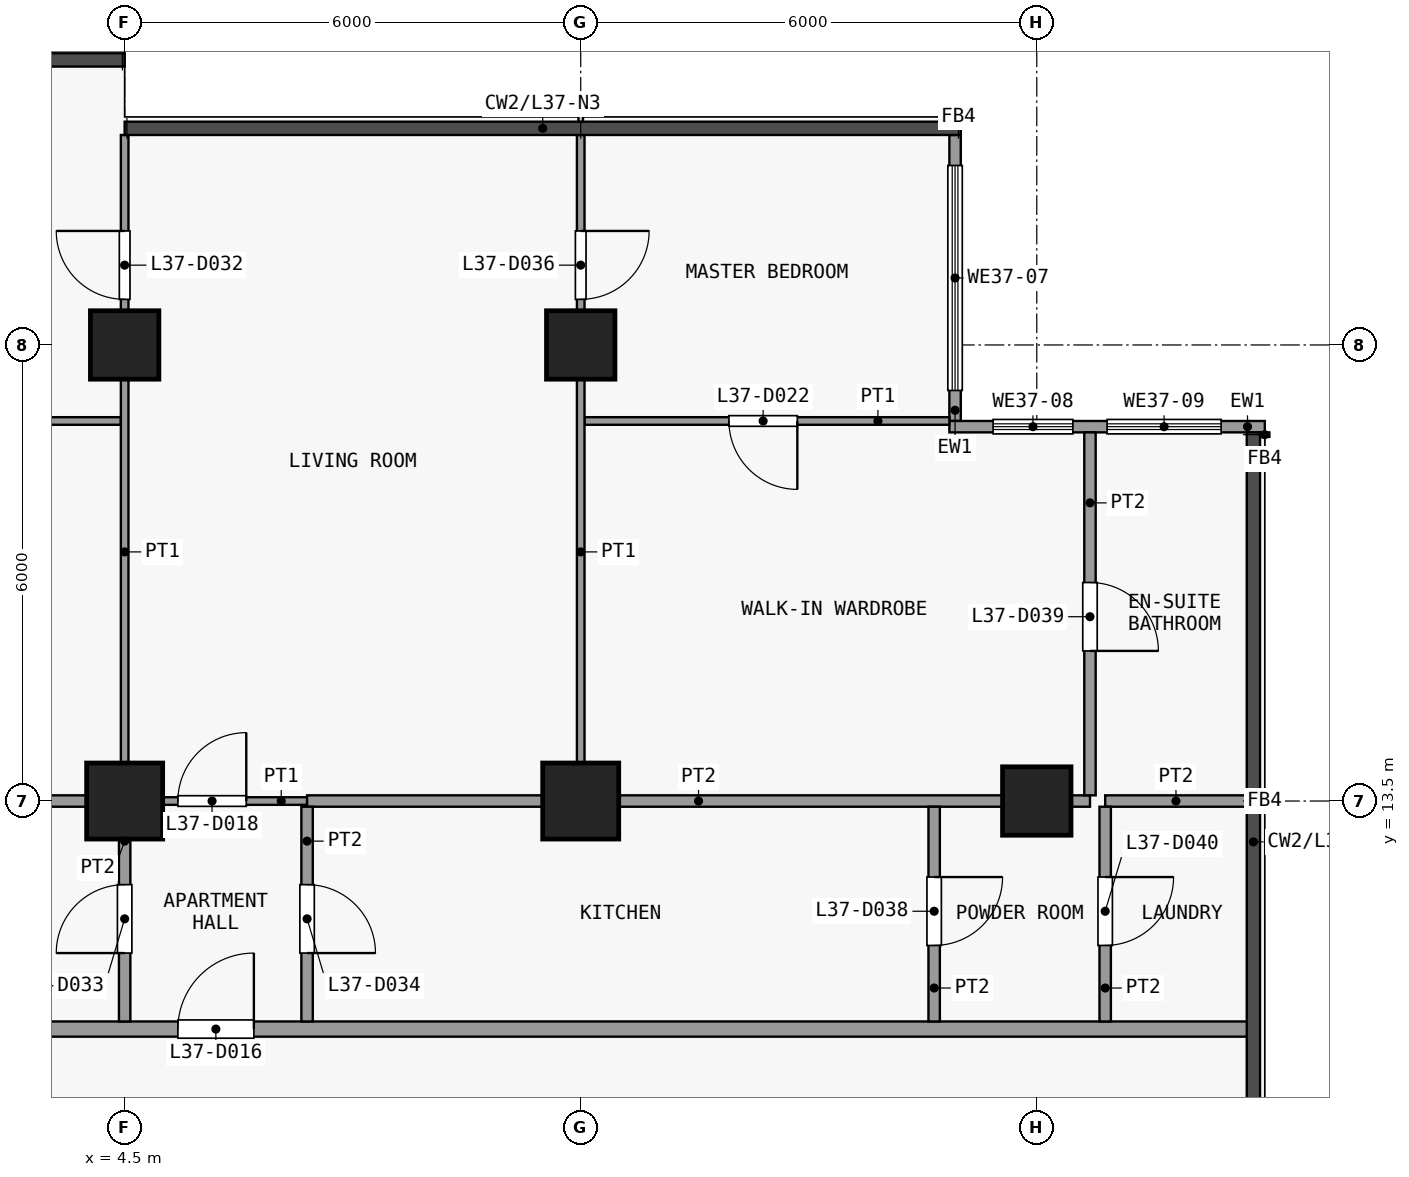
"""IFC4 building model, lengths in metres.
Left out: names, types, materials, properties, quantities, classifications, styles, units other than length and angle.
Written with IfcOpenShell. Run it as: python <this file> out.ifc"""

import sys

from ifc_helpers import new_model, si_unit, direction, frame, frame_2d, origin, origin_2d, place, context, subcontext, project, spatial, rectangle, extrude, element, fill, save


model = new_model("IFC4")
c1 = context("Model", 3, precision=1e-05, world=origin(), true_north=direction((0.0, 1.0)))
c2 = subcontext(c1, "Body", "Model", "MODEL_VIEW")
j1 = project(units=[si_unit("LENGTHUNIT", "METRE"), si_unit("PLANEANGLEUNIT", "RADIAN")], contexts=[c1])
p1 = place(None, origin())
s1 = spatial("IfcSite", under=j1, at=p1, CompositionType="ELEMENT")
p2 = place(p1, origin())
s2 = spatial("IfcBuilding", under=s1, at=p2, CompositionType="ELEMENT")
p3 = place(p2, frame((0.0, 0.0, 152.9)))
s3 = spatial("IfcBuildingStorey", under=s2, at=p3, CompositionType="ELEMENT", Elevation=152.9)
p4 = place(p3, frame((4.5, 13.5, 0.0), z_axis=(0.0, 0.0, 1.0), x_axis=(1.0, 0.0, 0.0)))
e1 = element("IfcColumn", 1, at=p4, inside=s3, PredefinedType="COLUMN", context=c2, shape_type="SweptSolid", body=[
    extrude(rectangle(XDim=1.0, YDim=1.0, at=origin_2d()), origin(), (0.0, 0.0, 1.0), 3.6),
])
p5 = place(p3, frame((4.5, 19.5, 0.0), z_axis=(0.0, 0.0, 1.0), x_axis=(1.0, 0.0, 0.0)))
e2 = element("IfcColumn", 2, at=p5, inside=s3, PredefinedType="COLUMN", context=c2, shape_type="SweptSolid", body=[
    extrude(rectangle(XDim=0.9, YDim=0.9, at=origin_2d()), origin(), (0.0, 0.0, 1.0), 3.6),
])
p6 = place(p3, frame((10.5, 13.5, 0.0), z_axis=(0.0, 0.0, 1.0), x_axis=(1.0, 0.0, 0.0)))
e3 = element("IfcColumn", 3, at=p6, inside=s3, PredefinedType="COLUMN", context=c2, shape_type="SweptSolid", body=[
    extrude(rectangle(XDim=1.0, YDim=1.0, at=origin_2d()), origin(), (0.0, 0.0, 1.0), 3.6),
])
for number, where, z_axis, x_axis in (
    (4, (10.5, 19.5, 0.0), (0.0, 0.0, 1.0), (1.0, 0.0, 0.0)),
    (5, (16.5, 13.5, 0.0), (0.0, 0.0, 1.0), (1.0, 0.0, 0.0)),
):
    element("IfcColumn", number, at=place(p3, frame(where, z_axis=z_axis, x_axis=x_axis)), inside=s3, PredefinedType="COLUMN", context=c2, shape_type="SweptSolid", body=[
        extrude(rectangle(XDim=0.9, YDim=0.9, at=origin_2d()), origin(), (0.0, 0.0, 1.0), 3.6),
    ])
p7 = place(p3, frame((15.425, 22.262, 0.0), z_axis=(0.0, 0.0, 1.0), x_axis=(0.0, -1.0, 0.0)))
e6 = element("IfcWall", 6, at=p7, inside=s3, PredefinedType="SOLIDWALL", context=c2, shape_type="SweptSolid", body=[
    extrude(rectangle(XDim=3.762, YDim=0.15, at=frame_2d((1.881, 0.0))), origin(), (0.0, 0.0, 1.0), 3.3),
])
p8 = place(p7, frame((0.401, 0.0, 0.9)))
e7 = element("IfcOpeningElement", 7, at=p8, cuts=e6, PredefinedType="OPENING", context=c2, shape_type="SweptSolid", body=[
    extrude(rectangle(XDim=2.96, YDim=2.4, at=frame_2d((1.48, 1.2))), frame((0.0, 0.085, 0.0), z_axis=(0.0, -1.0, 0.0), x_axis=(1.0, 0.0, 0.0)), (0.0, 0.0, 1.0), 0.17),
])
p9 = place(p3, frame((15.35, 18.425, 0.0), z_axis=(0.0, 0.0, 1.0), x_axis=(1.0, 0.0, 0.0)))
e8 = element("IfcWall", 8, at=p9, inside=s3, PredefinedType="SOLIDWALL", context=c2, shape_type="SweptSolid", body=[
    extrude(rectangle(XDim=4.15, YDim=0.15, at=frame_2d((2.075, 0.0))), origin(), (0.0, 0.0, 1.0), 3.3),
])
p10 = place(p9, frame((0.575, 0.0, 0.9)))
e9 = element("IfcOpeningElement", 9, at=p10, cuts=e8, PredefinedType="OPENING", context=c2, shape_type="SweptSolid", body=[
    extrude(rectangle(XDim=1.05, YDim=2.4, at=frame_2d((0.525, 1.2))), frame((0.0, 0.085, 0.0), z_axis=(0.0, -1.0, 0.0), x_axis=(1.0, 0.0, 0.0)), (0.0, 0.0, 1.0), 0.17),
])
p11 = place(p9, frame((2.075, 0.0, 0.9)))
e10 = element("IfcOpeningElement", 10, at=p11, cuts=e8, PredefinedType="OPENING", context=c2, shape_type="SweptSolid", body=[
    extrude(rectangle(XDim=1.5, YDim=2.4, at=frame_2d((0.75, 1.2))), frame((0.0, 0.085, 0.0), z_axis=(0.0, -1.0, 0.0), x_axis=(1.0, 0.0, 0.0)), (0.0, 0.0, 1.0), 0.17),
])
p12 = place(p3, frame((-17.85, 10.5, 0.0), z_axis=(0.0, 0.0, 1.0), x_axis=(1.0, 0.0, 0.0)))
e11 = element("IfcWall", 11, at=p12, inside=s3, PredefinedType="PARTITIONING", context=c2, shape_type="SweptSolid", body=[
    extrude(rectangle(XDim=37.2, YDim=0.2, at=frame_2d((18.6, 0.0))), origin(), (0.0, 0.0, 1.0), 3.3),
])
p13 = place(p12, frame((5.55, 0.0, 0.0)))
e12 = element("IfcOpeningElement", 12, at=p13, cuts=e11, PredefinedType="OPENING", context=c2, shape_type="SweptSolid", body=[
    extrude(rectangle(XDim=1.0, YDim=2.1, at=frame_2d((0.5, 1.05))), frame((0.0, 0.11, 0.0), z_axis=(0.0, -1.0, 0.0), x_axis=(1.0, 0.0, 0.0)), (0.0, 0.0, 1.0), 0.22),
])
p14 = place(p12, frame((23.05, 0.0, 0.0)))
e13 = element("IfcOpeningElement", 13, at=p14, cuts=e11, PredefinedType="OPENING", context=c2, shape_type="SweptSolid", body=[
    extrude(rectangle(XDim=1.0, YDim=2.1, at=frame_2d((0.5, 1.05))), frame((0.0, 0.11, 0.0), z_axis=(0.0, -1.0, 0.0), x_axis=(1.0, 0.0, 0.0)), (0.0, 0.0, 1.0), 0.22),
])
p15 = place(p3, frame((4.5, 13.5, 0.0), z_axis=(0.0, 0.0, 1.0), x_axis=(1.0, 0.0, 0.0)))
e14 = element("IfcWall", 14, at=p15, inside=s3, PredefinedType="PARTITIONING", context=c2, shape_type="SweptSolid", body=[
    extrude(rectangle(XDim=2.4, YDim=0.1, at=frame_2d((1.2, 0.0))), origin(), (0.0, 0.0, 1.0), 3.3),
])
p16 = place(p15, frame((0.7, 0.0, 0.0)))
e15 = element("IfcOpeningElement", 15, at=p16, cuts=e14, PredefinedType="OPENING", context=c2, shape_type="SweptSolid", body=[
    extrude(rectangle(XDim=0.9, YDim=2.1, at=frame_2d((0.45, 1.05))), frame((0.0, 0.06, 0.0), z_axis=(0.0, -1.0, 0.0), x_axis=(1.0, 0.0, 0.0)), (0.0, 0.0, 1.0), 0.12),
])
p17 = place(p3, frame((0.0, 13.5, 0.0), z_axis=(0.0, 0.0, 1.0), x_axis=(1.0, 0.0, 0.0)))
e16 = element("IfcWall", 16, at=p17, inside=s3, PredefinedType="PARTITIONING", context=c2, shape_type="SweptSolid", body=[
    extrude(rectangle(XDim=4.5, YDim=0.15, at=frame_2d((2.25, 0.0))), origin(), (0.0, 0.0, 1.0), 3.3),
])
p18 = place(p3, frame((6.9, 13.5, 0.0), z_axis=(0.0, 0.0, 1.0), x_axis=(1.0, 0.0, 0.0)))
e17 = element("IfcWall", 17, at=p18, inside=s3, PredefinedType="PARTITIONING", context=c2, shape_type="SweptSolid", body=[
    extrude(rectangle(XDim=10.3, YDim=0.15, at=frame_2d((5.15, 0.0))), origin(), (0.0, 0.0, 1.0), 3.3),
])
p19 = place(p3, frame((17.4, 13.5, 0.0), z_axis=(0.0, 0.0, 1.0), x_axis=(1.0, 0.0, 0.0)))
e18 = element("IfcWall", 18, at=p19, inside=s3, PredefinedType="PARTITIONING", context=c2, shape_type="SweptSolid", body=[
    extrude(rectangle(XDim=1.863, YDim=0.15, at=frame_2d((0.931, 0.0))), origin(), (0.0, 0.0, 1.0), 3.3),
])
p20 = place(p3, frame((-4.4, 18.5, 0.0), z_axis=(0.0, 0.0, 1.0), x_axis=(1.0, 0.0, 0.0)))
e19 = element("IfcWall", 19, at=p20, inside=s3, PredefinedType="PARTITIONING", context=c2, shape_type="SweptSolid", body=[
    extrude(rectangle(XDim=8.85, YDim=0.1, at=frame_2d((4.425, 0.0))), origin(), (0.0, 0.0, 1.0), 3.3),
])
p21 = place(p20, frame((4.0, 0.0, 0.0)))
e20 = element("IfcOpeningElement", 20, at=p21, cuts=e19, PredefinedType="OPENING", context=c2, shape_type="SweptSolid", body=[
    extrude(rectangle(XDim=0.9, YDim=2.1, at=frame_2d((0.45, 1.05))), frame((0.0, 0.06, 0.0), z_axis=(0.0, -1.0, 0.0), x_axis=(1.0, 0.0, 0.0)), (0.0, 0.0, 1.0), 0.12),
])
p22 = place(p3, frame((10.55, 18.5, 0.0), z_axis=(0.0, 0.0, 1.0), x_axis=(1.0, 0.0, 0.0)))
e21 = element("IfcWall", 21, at=p22, inside=s3, PredefinedType="PARTITIONING", context=c2, shape_type="SweptSolid", body=[
    extrude(rectangle(XDim=4.8, YDim=0.1, at=frame_2d((2.4, 0.0))), origin(), (0.0, 0.0, 1.0), 3.3),
])
p23 = place(p22, frame((1.9, 0.0, 0.0)))
e22 = element("IfcOpeningElement", 22, at=p23, cuts=e21, PredefinedType="OPENING", context=c2, shape_type="SweptSolid", body=[
    extrude(rectangle(XDim=0.9, YDim=2.1, at=frame_2d((0.45, 1.05))), frame((0.0, 0.06, 0.0), z_axis=(0.0, -1.0, 0.0), x_axis=(1.0, 0.0, 0.0)), (0.0, 0.0, 1.0), 0.12),
])
p24 = place(p3, frame((4.5, 13.575, 0.0), z_axis=(0.0, 0.0, 1.0), x_axis=(0.0, 1.0, 0.0)))
e23 = element("IfcWall", 23, at=p24, inside=s3, PredefinedType="PARTITIONING", context=c2, shape_type="SweptSolid", body=[
    extrude(rectangle(XDim=8.688, YDim=0.1, at=frame_2d((4.344, 0.0))), origin(), (0.0, 0.0, 1.0), 3.3),
])
p25 = place(p24, frame((6.525, 0.0, 0.0)))
e24 = element("IfcOpeningElement", 24, at=p25, cuts=e23, PredefinedType="OPENING", context=c2, shape_type="SweptSolid", body=[
    extrude(rectangle(XDim=0.9, YDim=2.1, at=frame_2d((0.45, 1.05))), frame((0.0, 0.06, 0.0), z_axis=(0.0, -1.0, 0.0), x_axis=(1.0, 0.0, 0.0)), (0.0, 0.0, 1.0), 0.12),
])
p26 = place(p3, frame((4.5, 10.6, 0.0), z_axis=(0.0, 0.0, 1.0), x_axis=(0.0, 1.0, 0.0)))
e25 = element("IfcWall", 25, at=p26, inside=s3, PredefinedType="PARTITIONING", context=c2, shape_type="SweptSolid", body=[
    extrude(rectangle(XDim=2.825, YDim=0.15, at=frame_2d((1.413, 0.0))), origin(), (0.0, 0.0, 1.0), 3.3),
])
p27 = place(p26, frame((0.9, 0.0, 0.0)))
e26 = element("IfcOpeningElement", 26, at=p27, cuts=e25, PredefinedType="OPENING", context=c2, shape_type="SweptSolid", body=[
    extrude(rectangle(XDim=0.9, YDim=2.1, at=frame_2d((0.45, 1.05))), frame((0.0, 0.085, 0.0), z_axis=(0.0, -1.0, 0.0), x_axis=(1.0, 0.0, 0.0)), (0.0, 0.0, 1.0), 0.17),
])
p28 = place(p3, frame((6.9, 10.6, 0.0), z_axis=(0.0, 0.0, 1.0), x_axis=(0.0, 1.0, 0.0)))
e27 = element("IfcWall", 27, at=p28, inside=s3, PredefinedType="PARTITIONING", context=c2, shape_type="SweptSolid", body=[
    extrude(rectangle(XDim=2.825, YDim=0.15, at=frame_2d((1.413, 0.0))), origin(), (0.0, 0.0, 1.0), 3.3),
])
p29 = place(p28, frame((0.9, 0.0, 0.0)))
e28 = element("IfcOpeningElement", 28, at=p29, cuts=e27, PredefinedType="OPENING", context=c2, shape_type="SweptSolid", body=[
    extrude(rectangle(XDim=0.9, YDim=2.1, at=frame_2d((0.45, 1.05))), frame((0.0, 0.085, 0.0), z_axis=(0.0, -1.0, 0.0), x_axis=(1.0, 0.0, 0.0)), (0.0, 0.0, 1.0), 0.17),
])
p30 = place(p3, frame((10.5, 13.575, 0.0), z_axis=(0.0, 0.0, 1.0), x_axis=(0.0, 1.0, 0.0)))
e29 = element("IfcWall", 29, at=p30, inside=s3, PredefinedType="PARTITIONING", context=c2, shape_type="SweptSolid", body=[
    extrude(rectangle(XDim=8.688, YDim=0.1, at=frame_2d((4.344, 0.0))), origin(), (0.0, 0.0, 1.0), 3.3),
])
p31 = place(p30, frame((6.525, 0.0, 0.0)))
e30 = element("IfcOpeningElement", 30, at=p31, cuts=e29, PredefinedType="OPENING", context=c2, shape_type="SweptSolid", body=[
    extrude(rectangle(XDim=0.9, YDim=2.1, at=frame_2d((0.45, 1.05))), frame((0.0, 0.06, 0.0), z_axis=(0.0, -1.0, 0.0), x_axis=(1.0, 0.0, 0.0)), (0.0, 0.0, 1.0), 0.12),
])
p32 = place(p3, frame((15.15, 10.6, 0.0), z_axis=(0.0, 0.0, 1.0), x_axis=(0.0, 1.0, 0.0)))
e31 = element("IfcWall", 31, at=p32, inside=s3, PredefinedType="PARTITIONING", context=c2, shape_type="SweptSolid", body=[
    extrude(rectangle(XDim=2.825, YDim=0.15, at=frame_2d((1.413, 0.0))), origin(), (0.0, 0.0, 1.0), 3.3),
])
p33 = place(p32, frame((1.0, 0.0, 0.0)))
e32 = element("IfcOpeningElement", 32, at=p33, cuts=e31, PredefinedType="OPENING", context=c2, shape_type="SweptSolid", body=[
    extrude(rectangle(XDim=0.9, YDim=2.1, at=frame_2d((0.45, 1.05))), frame((0.0, 0.085, 0.0), z_axis=(0.0, -1.0, 0.0), x_axis=(1.0, 0.0, 0.0)), (0.0, 0.0, 1.0), 0.17),
])
p34 = place(p3, frame((17.2, 13.575, 0.0), z_axis=(0.0, 0.0, 1.0), x_axis=(0.0, 1.0, 0.0)))
e33 = element("IfcWall", 33, at=p34, inside=s3, PredefinedType="PARTITIONING", context=c2, shape_type="SweptSolid", body=[
    extrude(rectangle(XDim=4.775, YDim=0.15, at=frame_2d((2.388, 0.0))), origin(), (0.0, 0.0, 1.0), 3.3),
])
p35 = place(p34, frame((1.9, 0.0, 0.0)))
e34 = element("IfcOpeningElement", 34, at=p35, cuts=e33, PredefinedType="OPENING", context=c2, shape_type="SweptSolid", body=[
    extrude(rectangle(XDim=0.9, YDim=2.1, at=frame_2d((0.45, 1.05))), frame((0.0, 0.085, 0.0), z_axis=(0.0, -1.0, 0.0), x_axis=(1.0, 0.0, 0.0)), (0.0, 0.0, 1.0), 0.17),
])
p36 = place(p3, frame((17.4, 10.6, 0.0), z_axis=(0.0, 0.0, 1.0), x_axis=(0.0, 1.0, 0.0)))
e35 = element("IfcWall", 35, at=p36, inside=s3, PredefinedType="PARTITIONING", context=c2, shape_type="SweptSolid", body=[
    extrude(rectangle(XDim=2.825, YDim=0.15, at=frame_2d((1.413, 0.0))), origin(), (0.0, 0.0, 1.0), 3.3),
])
p37 = place(p36, frame((1.0, 0.0, 0.0)))
e36 = element("IfcOpeningElement", 36, at=p37, cuts=e35, PredefinedType="OPENING", context=c2, shape_type="SweptSolid", body=[
    extrude(rectangle(XDim=0.9, YDim=2.1, at=frame_2d((0.45, 1.05))), frame((0.0, 0.085, 0.0), z_axis=(0.0, -1.0, 0.0), x_axis=(1.0, 0.0, 0.0)), (0.0, 0.0, 1.0), 0.17),
])
p38 = place(p8, origin())
e37 = element("IfcWindow", 37, at=p38, inside=s3, PartitioningType="SINGLE_PANEL", PredefinedType="WINDOW", context=c2, shape_type="SweptSolid", body=[
    extrude(rectangle(XDim=2.96, YDim=2.4, at=frame_2d((1.48, 1.2))), frame((0.0, 0.03, 0.0), z_axis=(0.0, -1.0, 0.0), x_axis=(1.0, 0.0, 0.0)), (0.0, 0.0, 1.0), 0.06),
])
fill(e7, e37)
p39 = place(p10, origin())
e38 = element("IfcWindow", 38, at=p39, inside=s3, PartitioningType="SINGLE_PANEL", PredefinedType="WINDOW", context=c2, shape_type="SweptSolid", body=[
    extrude(rectangle(XDim=1.05, YDim=2.4, at=frame_2d((0.525, 1.2))), frame((0.0, 0.03, 0.0), z_axis=(0.0, -1.0, 0.0), x_axis=(1.0, 0.0, 0.0)), (0.0, 0.0, 1.0), 0.06),
])
fill(e9, e38)
p40 = place(p11, origin())
e39 = element("IfcWindow", 39, at=p40, inside=s3, PartitioningType="SINGLE_PANEL", PredefinedType="WINDOW", context=c2, shape_type="SweptSolid", body=[
    extrude(rectangle(XDim=1.5, YDim=2.4, at=frame_2d((0.75, 1.2))), frame((0.0, 0.03, 0.0), z_axis=(0.0, -1.0, 0.0), x_axis=(1.0, 0.0, 0.0)), (0.0, 0.0, 1.0), 0.06),
])
fill(e10, e39)
p41 = place(p14, origin())
e40 = element("IfcDoor", 40, at=p41, inside=s3, OperationType="SINGLE_SWING_LEFT", PredefinedType="DOOR", context=c2, shape_type="SweptSolid", body=[
    extrude(rectangle(XDim=1.0, YDim=2.1, at=frame_2d((0.5, 1.05))), frame((0.0, 0.025, 0.0), z_axis=(0.0, -1.0, 0.0), x_axis=(1.0, 0.0, 0.0)), (0.0, 0.0, 1.0), 0.05),
])
fill(e13, e40)
p42 = place(p16, origin())
e41 = element("IfcDoor", 41, at=p42, inside=s3, OperationType="SINGLE_SWING_LEFT", PredefinedType="DOOR", context=c2, shape_type="SweptSolid", body=[
    extrude(rectangle(XDim=0.9, YDim=2.1, at=frame_2d((0.45, 1.05))), frame((0.0, 0.025, 0.0), z_axis=(0.0, -1.0, 0.0), x_axis=(1.0, 0.0, 0.0)), (0.0, 0.0, 1.0), 0.05),
])
fill(e15, e41)
p43 = place(p23, origin())
e42 = element("IfcDoor", 42, at=p43, inside=s3, OperationType="SINGLE_SWING_RIGHT", PredefinedType="DOOR", context=c2, shape_type="SweptSolid", body=[
    extrude(rectangle(XDim=0.9, YDim=2.1, at=frame_2d((0.45, 1.05))), frame((0.0, 0.025, 0.0), z_axis=(0.0, -1.0, 0.0), x_axis=(1.0, 0.0, 0.0)), (0.0, 0.0, 1.0), 0.05),
])
fill(e22, e42)
p44 = place(p25, origin())
e43 = element("IfcDoor", 43, at=p44, inside=s3, OperationType="SINGLE_SWING_LEFT", PredefinedType="DOOR", context=c2, shape_type="SweptSolid", body=[
    extrude(rectangle(XDim=0.9, YDim=2.1, at=frame_2d((0.45, 1.05))), frame((0.0, 0.025, 0.0), z_axis=(0.0, -1.0, 0.0), x_axis=(1.0, 0.0, 0.0)), (0.0, 0.0, 1.0), 0.05),
])
fill(e24, e43)
p45 = place(p27, origin())
e44 = element("IfcDoor", 44, at=p45, inside=s3, OperationType="SINGLE_SWING_RIGHT", PredefinedType="DOOR", context=c2, shape_type="SweptSolid", body=[
    extrude(rectangle(XDim=0.9, YDim=2.1, at=frame_2d((0.45, 1.05))), frame((0.0, 0.025, 0.0), z_axis=(0.0, -1.0, 0.0), x_axis=(1.0, 0.0, 0.0)), (0.0, 0.0, 1.0), 0.05),
])
fill(e26, e44)
p46 = place(p29, origin())
e45 = element("IfcDoor", 45, at=p46, inside=s3, OperationType="SINGLE_SWING_LEFT", PredefinedType="DOOR", context=c2, shape_type="SweptSolid", body=[
    extrude(rectangle(XDim=0.9, YDim=2.1, at=frame_2d((0.45, 1.05))), frame((0.0, 0.025, 0.0), z_axis=(0.0, -1.0, 0.0), x_axis=(1.0, 0.0, 0.0)), (0.0, 0.0, 1.0), 0.05),
])
fill(e28, e45)
p47 = place(p31, origin())
e46 = element("IfcDoor", 46, at=p47, inside=s3, OperationType="SINGLE_SWING_RIGHT", PredefinedType="DOOR", context=c2, shape_type="SweptSolid", body=[
    extrude(rectangle(XDim=0.9, YDim=2.1, at=frame_2d((0.45, 1.05))), frame((0.0, 0.025, 0.0), z_axis=(0.0, -1.0, 0.0), x_axis=(1.0, 0.0, 0.0)), (0.0, 0.0, 1.0), 0.05),
])
fill(e30, e46)
p48 = place(p33, origin())
e47 = element("IfcDoor", 47, at=p48, inside=s3, OperationType="SINGLE_SWING_RIGHT", PredefinedType="DOOR", context=c2, shape_type="SweptSolid", body=[
    extrude(rectangle(XDim=0.9, YDim=2.1, at=frame_2d((0.45, 1.05))), frame((0.0, 0.025, 0.0), z_axis=(0.0, -1.0, 0.0), x_axis=(1.0, 0.0, 0.0)), (0.0, 0.0, 1.0), 0.05),
])
fill(e32, e47)
p49 = place(p35, origin())
e48 = element("IfcDoor", 48, at=p49, inside=s3, OperationType="SINGLE_SWING_LEFT", PredefinedType="DOOR", context=c2, shape_type="SweptSolid", body=[
    extrude(rectangle(XDim=0.9, YDim=2.1, at=frame_2d((0.45, 1.05))), frame((0.0, 0.025, 0.0), z_axis=(0.0, -1.0, 0.0), x_axis=(1.0, 0.0, 0.0)), (0.0, 0.0, 1.0), 0.05),
])
fill(e34, e48)
p50 = place(p37, origin())
e49 = element("IfcDoor", 49, at=p50, inside=s3, OperationType="SINGLE_SWING_RIGHT", PredefinedType="DOOR", context=c2, shape_type="SweptSolid", body=[
    extrude(rectangle(XDim=0.9, YDim=2.1, at=frame_2d((0.45, 1.05))), frame((0.0, 0.025, 0.0), z_axis=(0.0, -1.0, 0.0), x_axis=(1.0, 0.0, 0.0)), (0.0, 0.0, 1.0), 0.05),
])
fill(e36, e49)
save(model, sys.argv[1])
